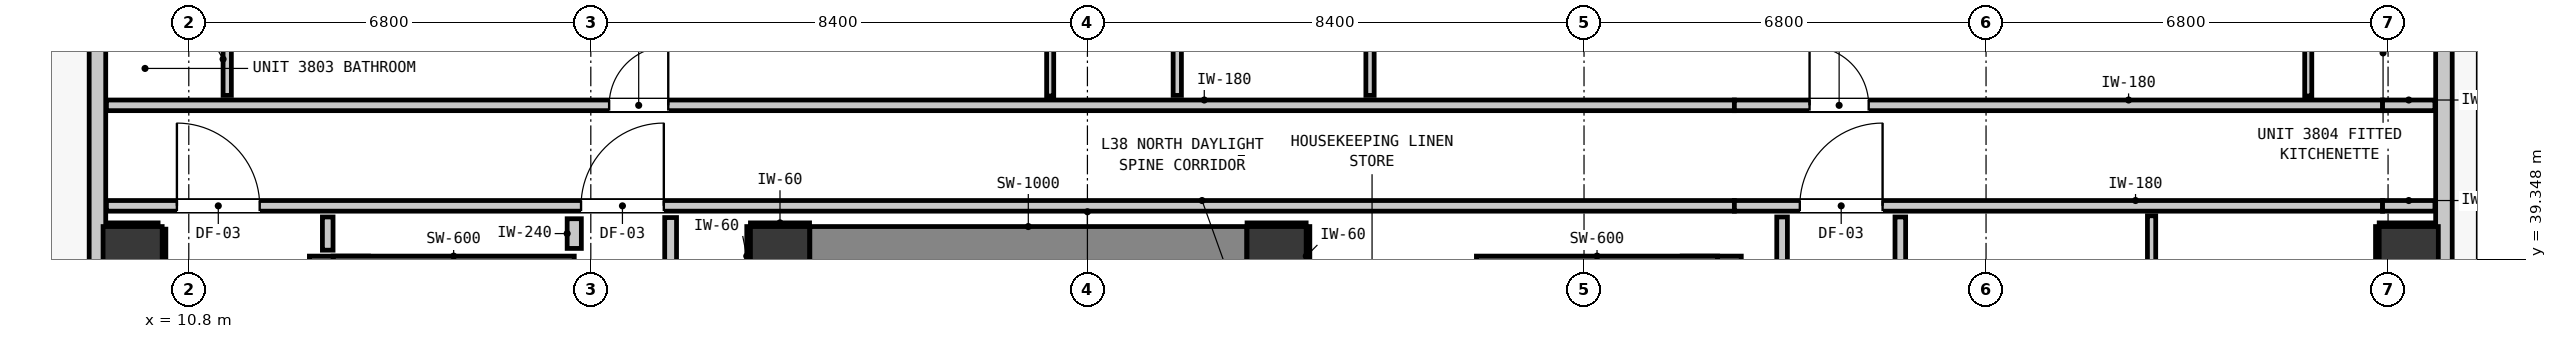
"""IFC4 building model, lengths in metres.
Left out: names, types, materials, properties, quantities, classifications, styles, units other than length and angle.
Written with IfcOpenShell. Run it as: python <this file> out.ifc"""

import sys

from ifc_helpers import new_model, si_unit, direction, frame, frame_2d, origin, origin_2d, place, context, subcontext, project, spatial, rectangle, extrude, element, fill, save


model = new_model("IFC4")
c1 = context("Model", 3, precision=1e-05, world=origin(), true_north=direction((0.0, 1.0)))
c2 = subcontext(c1, "Body", "Model", "MODEL_VIEW")
j1 = project(units=[si_unit("LENGTHUNIT", "METRE"), si_unit("PLANEANGLEUNIT", "RADIAN")], contexts=[c1])
p1 = place(None, origin())
s1 = spatial("IfcSite", under=j1, at=p1, CompositionType="ELEMENT")
p2 = place(p1, origin())
s2 = spatial("IfcBuilding", under=s1, at=p2, CompositionType="ELEMENT")
p3 = place(p2, frame((0.0, 0.0, 132.64)))
s3 = spatial("IfcBuildingStorey", under=s2, at=p3, CompositionType="ELEMENT", Elevation=132.64)
for number, where, z_axis, x_axis in (
    (1, (20.8, 39.4, 0.0), (0.0, 0.0, 1.0), (1.0, 0.0, 0.0)),
    (2, (29.2, 39.4, 0.0), (0.0, 0.0, 1.0), (1.0, 0.0, 0.0)),
):
    element("IfcColumn", number, at=place(p3, frame(where, z_axis=z_axis, x_axis=x_axis)), inside=s3, PredefinedType="COLUMN", context=c2, shape_type="SweptSolid", body=[
        extrude(rectangle(XDim=1.0, YDim=1.0, at=origin_2d()), origin(), (0.0, 0.0, 1.0), 3.32),
    ])
p4 = place(p3, frame((13.34, 31.205, 0.0), z_axis=(0.0, 0.0, 1.0), x_axis=(0.0, 1.0, 0.0)))
e3 = element("IfcWall", 3, at=p4, inside=s3, PredefinedType="SHEAR", context=c2, shape_type="SweptSolid", body=[
    extrude(rectangle(XDim=8.195, YDim=1.0, at=frame_2d((4.097, 0.0))), origin(), (0.0, 0.0, 1.0), 3.32),
])
p5 = place(p3, frame((13.24, 39.1, 0.0), z_axis=(0.0, 0.0, 1.0), x_axis=(1.0, 0.0, 0.0)))
e4 = element("IfcWall", 4, at=p5, inside=s3, PredefinedType="SHEAR", context=c2, shape_type="SweptSolid", body=[
    extrude(rectangle(XDim=4.08, YDim=0.6, at=frame_2d((2.04, 0.0))), origin(), (0.0, 0.0, 1.0), 3.32),
])
p6 = place(p3, frame((36.56, 31.205, 0.0), z_axis=(0.0, 0.0, 1.0), x_axis=(0.0, 1.0, 0.0)))
e5 = element("IfcWall", 5, at=p6, inside=s3, PredefinedType="SHEAR", context=c2, shape_type="SweptSolid", body=[
    extrude(rectangle(XDim=8.195, YDim=1.0, at=frame_2d((4.097, 0.0))), origin(), (0.0, 0.0, 1.0), 3.32),
])
p7 = place(p3, frame((32.58, 39.1, 0.0), z_axis=(0.0, 0.0, 1.0), x_axis=(1.0, 0.0, 0.0)))
e6 = element("IfcWall", 6, at=p7, inside=s3, PredefinedType="SHEAR", context=c2, shape_type="SweptSolid", body=[
    extrude(rectangle(XDim=4.08, YDim=0.6, at=frame_2d((2.04, 0.0))), origin(), (0.0, 0.0, 1.0), 3.32),
])
p8 = place(p3, frame((21.305, 39.4, 0.0), z_axis=(0.0, 0.0, 1.0), x_axis=(1.0, 0.0, 0.0)))
e7 = element("IfcWall", 7, at=p8, inside=s3, PredefinedType="SHEAR", context=c2, shape_type="SweptSolid", body=[
    extrude(rectangle(XDim=7.39, YDim=1.0, at=frame_2d((3.695, 0.0))), origin(), (0.0, 0.0, 1.0), 3.32),
])
for number, where, z_axis, x_axis in (
    (8, (9.85, 39.4, 0.0), (0.0, 0.0, 1.0), (1.0, 0.0, 0.0)),
    (9, (48.35, 39.4, 0.0), (0.0, 0.0, 1.0), (1.0, 0.0, 0.0)),
):
    element("IfcColumn", number, at=place(p3, frame(where, z_axis=z_axis, x_axis=x_axis)), inside=s3, PredefinedType="COLUMN", context=c2, shape_type="SweptSolid", body=[
        extrude(rectangle(XDim=1.0, YDim=1.0, at=origin_2d()), origin(), (0.0, 0.0, 1.0), 3.32),
    ])
p9 = place(p3, frame((9.255, 11.355, 0.0), z_axis=(0.0, 0.0, 1.0), x_axis=(0.0, 1.0, 0.0)))
e10 = element("IfcWall", 10, at=p9, inside=s3, PredefinedType="STANDARD", context=c2, shape_type="SweptSolid", body=[
    extrude(rectangle(XDim=32.29, YDim=0.28, at=frame_2d((16.145, 0.0))), origin(), (0.0, 0.0, 1.0), 3.08),
])
p10 = place(p9, frame((5.818, 0.0, 0.0)))
e11 = element("IfcOpeningElement", 11, at=p10, cuts=e10, PredefinedType="OPENING", context=c2, shape_type="SweptSolid", body=[
    extrude(rectangle(XDim=1.0, YDim=2.15, at=frame_2d((0.5, 1.075))), frame((0.0, 0.15, 0.0), z_axis=(0.0, -1.0, 0.0), x_axis=(1.0, 0.0, 0.0)), (0.0, 0.0, 1.0), 0.3),
])
p11 = place(p9, frame((0.544, 0.0, 0.85)))
e12 = element("IfcOpeningElement", 12, at=p11, cuts=e10, PredefinedType="OPENING", context=c2, shape_type="SweptSolid", body=[
    extrude(rectangle(XDim=1.05, YDim=1.65, at=frame_2d((0.525, 0.825))), frame((0.0, 0.15, 0.0), z_axis=(0.0, -1.0, 0.0), x_axis=(1.0, 0.0, 0.0)), (0.0, 0.0, 1.0), 0.3),
])
p12 = place(p3, frame((48.945, 43.645, 0.0), z_axis=(0.0, 0.0, 1.0), x_axis=(0.0, -1.0, 0.0)))
e13 = element("IfcWall", 13, at=p12, inside=s3, PredefinedType="STANDARD", context=c2, shape_type="SweptSolid", body=[
    extrude(rectangle(XDim=32.29, YDim=0.28, at=frame_2d((16.145, 0.0))), origin(), (0.0, 0.0, 1.0), 3.08),
])
p13 = place(p12, frame((5.467, 0.0, 0.0)))
e14 = element("IfcOpeningElement", 14, at=p13, cuts=e13, PredefinedType="OPENING", context=c2, shape_type="SweptSolid", body=[
    extrude(rectangle(XDim=1.0, YDim=2.15, at=frame_2d((0.5, 1.075))), frame((0.0, 0.15, 0.0), z_axis=(0.0, -1.0, 0.0), x_axis=(1.0, 0.0, 0.0)), (0.0, 0.0, 1.0), 0.3),
])
p14 = place(p12, frame((30.696, 0.0, 0.85)))
e15 = element("IfcOpeningElement", 15, at=p14, cuts=e13, PredefinedType="OPENING", context=c2, shape_type="SweptSolid", body=[
    extrude(rectangle(XDim=1.05, YDim=1.65, at=frame_2d((0.525, 0.825))), frame((0.0, 0.15, 0.0), z_axis=(0.0, -1.0, 0.0), x_axis=(1.0, 0.0, 0.0)), (0.0, 0.0, 1.0), 0.3),
])
p15 = place(p12, frame((14.611, 0.0, 0.85)))
e16 = element("IfcOpeningElement", 16, at=p15, cuts=e13, PredefinedType="OPENING", context=c2, shape_type="SweptSolid", body=[
    extrude(rectangle(XDim=2.1, YDim=1.9, at=frame_2d((1.05, 0.95))), frame((0.0, 0.15, 0.0), z_axis=(0.0, -1.0, 0.0), x_axis=(1.0, 0.0, 0.0)), (0.0, 0.0, 1.0), 0.3),
])
p16 = place(p12, frame((7.106, 0.0, 0.85)))
e17 = element("IfcOpeningElement", 17, at=p16, cuts=e13, PredefinedType="OPENING", context=c2, shape_type="SweptSolid", body=[
    extrude(rectangle(XDim=1.05, YDim=1.65, at=frame_2d((0.525, 0.825))), frame((0.0, 0.15, 0.0), z_axis=(0.0, -1.0, 0.0), x_axis=(1.0, 0.0, 0.0)), (0.0, 0.0, 1.0), 0.3),
])
p17 = place(p3, frame((9.407, 40.25, 0.0), z_axis=(0.0, 0.0, 1.0), x_axis=(1.0, 0.0, 0.0)))
e18 = element("IfcWall", 18, at=p17, inside=s3, PredefinedType="PARTITIONING", context=c2, shape_type="SweptSolid", body=[
    extrude(rectangle(XDim=27.536, YDim=0.18, at=frame_2d((13.768, 0.0))), origin(), (0.0, 0.0, 1.0), 3.08),
])
p18 = place(p17, frame((8.028, 0.0, 0.0)))
e19 = element("IfcOpeningElement", 19, at=p18, cuts=e18, PredefinedType="OPENING", context=c2, shape_type="SweptSolid", body=[
    extrude(rectangle(XDim=1.4, YDim=2.15, at=frame_2d((0.7, 1.075))), frame((0.0, 0.1, 0.0), z_axis=(0.0, -1.0, 0.0), x_axis=(1.0, 0.0, 0.0)), (0.0, 0.0, 1.0), 0.2),
])
p19 = place(p17, frame((1.192, 0.0, 0.0)))
e20 = element("IfcOpeningElement", 20, at=p19, cuts=e18, PredefinedType="OPENING", context=c2, shape_type="SweptSolid", body=[
    extrude(rectangle(XDim=1.4, YDim=2.15, at=frame_2d((0.7, 1.075))), frame((0.0, 0.1, 0.0), z_axis=(0.0, -1.0, 0.0), x_axis=(1.0, 0.0, 0.0)), (0.0, 0.0, 1.0), 0.2),
])
p20 = place(p3, frame((36.943, 40.25, 0.0), z_axis=(0.0, 0.0, 1.0), x_axis=(1.0, 0.0, 0.0)))
e21 = element("IfcWall", 21, at=p20, inside=s3, PredefinedType="PARTITIONING", context=c2, shape_type="SweptSolid", body=[
    extrude(rectangle(XDim=10.964, YDim=0.18, at=frame_2d((5.482, 0.0))), origin(), (0.0, 0.0, 1.0), 2.565),
])
p21 = place(p20, frame((1.107, 0.0, 0.0)))
e22 = element("IfcOpeningElement", 22, at=p21, cuts=e21, PredefinedType="OPENING", context=c2, shape_type="SweptSolid", body=[
    extrude(rectangle(XDim=1.4, YDim=2.15, at=frame_2d((0.7, 1.075))), frame((0.0, 0.1, 0.0), z_axis=(0.0, -1.0, 0.0), x_axis=(1.0, 0.0, 0.0)), (0.0, 0.0, 1.0), 0.2),
])
p22 = place(p3, frame((47.907, 40.25, 0.0), z_axis=(0.0, 0.0, 1.0), x_axis=(1.0, 0.0, 0.0)))
e23 = element("IfcWall", 23, at=p22, inside=s3, PredefinedType="PARTITIONING", context=c2, shape_type="SweptSolid", body=[
    extrude(rectangle(XDim=0.886, YDim=0.18, at=frame_2d((0.443, 0.0))), origin(), (0.0, 0.0, 1.0), 3.08),
])
p23 = place(p3, frame((9.407, 41.95, 0.0), z_axis=(0.0, 0.0, 1.0), x_axis=(1.0, 0.0, 0.0)))
e24 = element("IfcWall", 24, at=p23, inside=s3, PredefinedType="PARTITIONING", context=c2, shape_type="SweptSolid", body=[
    extrude(rectangle(XDim=27.536, YDim=0.18, at=frame_2d((13.768, 0.0))), origin(), (0.0, 0.0, 1.0), 3.08),
])
p24 = place(p23, frame((8.503, 0.0, 0.0)))
e25 = element("IfcOpeningElement", 25, at=p24, cuts=e24, PredefinedType="OPENING", context=c2, shape_type="SweptSolid", body=[
    extrude(rectangle(XDim=1.0, YDim=2.15, at=frame_2d((0.5, 1.075))), frame((0.0, 0.1, 0.0), z_axis=(0.0, -1.0, 0.0), x_axis=(1.0, 0.0, 0.0)), (0.0, 0.0, 1.0), 0.2),
])
p25 = place(p3, frame((36.943, 41.95, 0.0), z_axis=(0.0, 0.0, 1.0), x_axis=(1.0, 0.0, 0.0)))
e26 = element("IfcWall", 26, at=p25, inside=s3, PredefinedType="PARTITIONING", context=c2, shape_type="SweptSolid", body=[
    extrude(rectangle(XDim=10.964, YDim=0.18, at=frame_2d((5.482, 0.0))), origin(), (0.0, 0.0, 1.0), 2.565),
])
p26 = place(p25, frame((1.272, 0.0, 0.0)))
e27 = element("IfcOpeningElement", 27, at=p26, cuts=e26, PredefinedType="OPENING", context=c2, shape_type="SweptSolid", body=[
    extrude(rectangle(XDim=1.0, YDim=2.15, at=frame_2d((0.5, 1.075))), frame((0.0, 0.1, 0.0), z_axis=(0.0, -1.0, 0.0), x_axis=(1.0, 0.0, 0.0)), (0.0, 0.0, 1.0), 0.2),
])
p27 = place(p3, frame((47.907, 41.95, 0.0), z_axis=(0.0, 0.0, 1.0), x_axis=(1.0, 0.0, 0.0)))
e28 = element("IfcWall", 28, at=p27, inside=s3, PredefinedType="PARTITIONING", context=c2, shape_type="SweptSolid", body=[
    extrude(rectangle(XDim=0.886, YDim=0.18, at=frame_2d((0.443, 0.0))), origin(), (0.0, 0.0, 1.0), 3.08),
])
p28 = place(p3, frame((17.32, 39.53, 0.0), z_axis=(0.0, 0.0, 1.0), x_axis=(0.0, 1.0, 0.0)))
e29 = element("IfcWall", 29, at=p28, inside=s3, PredefinedType="PARTITIONING", context=c2, shape_type="SweptSolid", body=[
    extrude(rectangle(XDim=0.502, YDim=0.24, at=frame_2d((0.251, 0.0))), origin(), (0.0, 0.0, 1.0), 3.08),
])
p29 = place(p3, frame((18.95, 38.918, 0.0), z_axis=(0.0, 0.0, 1.0), x_axis=(0.0, 1.0, 0.0)))
e30 = element("IfcWall", 30, at=p29, inside=s3, PredefinedType="PARTITIONING", context=c2, shape_type="SweptSolid", body=[
    extrude(rectangle(XDim=1.134, YDim=0.2, at=frame_2d((0.567, 0.0))), origin(), (0.0, 0.0, 1.0), 3.08),
])
p30 = place(p3, frame((13.15, 39.5, 0.0), z_axis=(0.0, 0.0, 1.0), x_axis=(0.0, 1.0, 0.0)))
e31 = element("IfcWall", 31, at=p30, inside=s3, PredefinedType="PARTITIONING", context=c2, shape_type="SweptSolid", body=[
    extrude(rectangle(XDim=0.562, YDim=0.18, at=frame_2d((0.281, 0.0))), origin(), (0.0, 0.0, 1.0), 2.315),
])
p31 = place(p3, frame((37.75, 21.368, 0.0), z_axis=(0.0, 0.0, 1.0), x_axis=(0.0, 1.0, 0.0)))
e32 = element("IfcWall", 32, at=p31, inside=s3, PredefinedType="PARTITIONING", context=c2, shape_type="SweptSolid", body=[
    extrude(rectangle(XDim=18.694, YDim=0.18, at=frame_2d((9.347, 0.0))), origin(), (0.0, 0.0, 1.0), 3.08),
])
p32 = place(p3, frame((39.75, 35.118, 0.0), z_axis=(0.0, 0.0, 1.0), x_axis=(0.0, 1.0, 0.0)))
e33 = element("IfcWall", 33, at=p32, inside=s3, PredefinedType="PARTITIONING", context=c2, shape_type="SweptSolid", body=[
    extrude(rectangle(XDim=4.944, YDim=0.18, at=frame_2d((2.472, 0.0))), origin(), (0.0, 0.0, 1.0), 3.08),
])
p33 = place(p3, frame((11.45, 42.118, 0.0), z_axis=(0.0, 0.0, 1.0), x_axis=(0.0, 1.0, 0.0)))
e34 = element("IfcWall", 34, at=p33, inside=s3, PredefinedType="PARTITIONING", context=c2, shape_type="SweptSolid", body=[
    extrude(rectangle(XDim=2.808, YDim=0.14, at=frame_2d((1.404, 0.0))), origin(), (0.0, 0.0, 1.0), 2.565),
])
p34 = place(p33, frame((1.327, 0.0, 0.0)))
e35 = element("IfcOpeningElement", 35, at=p34, cuts=e34, PredefinedType="OPENING", context=c2, shape_type="SweptSolid", body=[
    extrude(rectangle(XDim=0.86, YDim=2.02, at=frame_2d((0.43, 1.01))), frame((0.0, 0.08, 0.0), z_axis=(0.0, -1.0, 0.0), x_axis=(1.0, 0.0, 0.0)), (0.0, 0.0, 1.0), 0.16),
])
p35 = place(p3, frame((27.52, 42.118, 0.0), z_axis=(0.0, 0.0, 1.0), x_axis=(0.0, 1.0, 0.0)))
e36 = element("IfcWall", 36, at=p35, inside=s3, PredefinedType="PARTITIONING", context=c2, shape_type="SweptSolid", body=[
    extrude(rectangle(XDim=3.675, YDim=0.14, at=frame_2d((1.837, 0.0))), origin(), (0.0, 0.0, 1.0), 3.08),
])
p36 = place(p3, frame((30.78, 42.118, 0.0), z_axis=(0.0, 0.0, 1.0), x_axis=(0.0, 1.0, 0.0)))
e37 = element("IfcWall", 37, at=p36, inside=s3, PredefinedType="PARTITIONING", context=c2, shape_type="SweptSolid", body=[
    extrude(rectangle(XDim=3.675, YDim=0.14, at=frame_2d((1.837, 0.0))), origin(), (0.0, 0.0, 1.0), 3.08),
])
p37 = place(p36, frame((1.327, 0.0, 0.0)))
e38 = element("IfcOpeningElement", 38, at=p37, cuts=e37, PredefinedType="OPENING", context=c2, shape_type="SweptSolid", body=[
    extrude(rectangle(XDim=0.86, YDim=2.02, at=frame_2d((0.43, 1.01))), frame((0.0, 0.08, 0.0), z_axis=(0.0, -1.0, 0.0), x_axis=(1.0, 0.0, 0.0)), (0.0, 0.0, 1.0), 0.16),
])
p38 = place(p3, frame((44.0, 35.098, 0.0), z_axis=(0.0, 0.0, 1.0), x_axis=(0.0, 1.0, 0.0)))
e39 = element("IfcWall", 39, at=p38, inside=s3, PredefinedType="PARTITIONING", context=c2, shape_type="SweptSolid", body=[
    extrude(rectangle(XDim=4.984, YDim=0.14, at=frame_2d((2.492, 0.0))), origin(), (0.0, 0.0, 1.0), 3.08),
])
p39 = place(p3, frame((25.37, 42.108, 0.0), z_axis=(0.0, 0.0, 1.0), x_axis=(0.0, 1.0, 0.0)))
e40 = element("IfcWall", 40, at=p39, inside=s3, PredefinedType="PARTITIONING", context=c2, shape_type="SweptSolid", body=[
    extrude(rectangle(XDim=3.685, YDim=0.12, at=frame_2d((1.843, 0.0))), origin(), (0.0, 0.0, 1.0), 3.08),
])
p40 = place(p39, frame((1.317, 0.0, 0.0)))
e41 = element("IfcOpeningElement", 41, at=p40, cuts=e40, PredefinedType="OPENING", context=c2, shape_type="SweptSolid", body=[
    extrude(rectangle(XDim=0.9, YDim=2.1, at=frame_2d((0.45, 1.05))), frame((0.0, 0.07, 0.0), z_axis=(0.0, -1.0, 0.0), x_axis=(1.0, 0.0, 0.0)), (0.0, 0.0, 1.0), 0.14),
])
p41 = place(p3, frame((46.65, 42.108, 0.0), z_axis=(0.0, 0.0, 1.0), x_axis=(0.0, 1.0, 0.0)))
e42 = element("IfcWall", 42, at=p41, inside=s3, PredefinedType="PARTITIONING", context=c2, shape_type="SweptSolid", body=[
    extrude(rectangle(XDim=3.617, YDim=0.12, at=frame_2d((1.809, 0.0))), origin(), (0.0, 0.0, 1.0), 3.08),
])
p42 = place(p41, frame((1.317, 0.0, 0.0)))
e43 = element("IfcOpeningElement", 43, at=p42, cuts=e42, PredefinedType="OPENING", context=c2, shape_type="SweptSolid", body=[
    extrude(rectangle(XDim=0.9, YDim=2.1, at=frame_2d((0.45, 1.05))), frame((0.0, 0.07, 0.0), z_axis=(0.0, -1.0, 0.0), x_axis=(1.0, 0.0, 0.0)), (0.0, 0.0, 1.0), 0.14),
])
for number, where, z_axis, x_axis in (
    (44, (20.3, 39.932, 0.0), (0.0, 0.0, 1.0), (1.0, 0.0, 0.0)),
    (45, (20.268, 38.9, 0.0), (0.0, 0.0, 1.0), (0.0, 1.0, 0.0)),
    (46, (28.7, 39.932, 0.0), (0.0, 0.0, 1.0), (1.0, 0.0, 0.0)),
    (47, (29.732, 38.9, 0.0), (0.0, 0.0, 1.0), (0.0, 1.0, 0.0)),
):
    element("IfcWall", number, at=place(p3, frame(where, z_axis=z_axis, x_axis=x_axis)), inside=s3, PredefinedType="PARTITIONING", context=c2, shape_type="SweptSolid", body=[
        extrude(rectangle(XDim=1.0, YDim=0.06, at=frame_2d((0.5, 0.0))), origin(), (0.0, 0.0, 1.0), 1.45),
    ])
p43 = place(p3, frame((9.41, 39.932, 0.0), z_axis=(0.0, 0.0, 1.0), x_axis=(1.0, 0.0, 0.0)))
e48 = element("IfcWall", 48, at=p43, inside=s3, PredefinedType="PARTITIONING", context=c2, shape_type="SweptSolid", body=[
    extrude(rectangle(XDim=0.871, YDim=0.06, at=frame_2d((0.436, 0.0))), origin(), (0.0, 0.0, 1.0), 1.45),
])
p44 = place(p3, frame((10.382, 38.9, 0.0), z_axis=(0.0, 0.0, 1.0), x_axis=(0.0, 1.0, 0.0)))
e49 = element("IfcWall", 49, at=p44, inside=s3, PredefinedType="PARTITIONING", context=c2, shape_type="SweptSolid", body=[
    extrude(rectangle(XDim=0.956, YDim=0.06, at=frame_2d((0.478, 0.0))), origin(), (0.0, 0.0, 1.0), 1.45),
])
p45 = place(p3, frame((47.85, 39.932, 0.0), z_axis=(0.0, 0.0, 1.0), x_axis=(1.0, 0.0, 0.0)))
e50 = element("IfcWall", 50, at=p45, inside=s3, PredefinedType="PARTITIONING", context=c2, shape_type="SweptSolid", body=[
    extrude(rectangle(XDim=0.94, YDim=0.06, at=frame_2d((0.47, 0.0))), origin(), (0.0, 0.0, 1.0), 1.45),
])
p46 = place(p3, frame((47.818, 38.9, 0.0), z_axis=(0.0, 0.0, 1.0), x_axis=(0.0, 1.0, 0.0)))
e51 = element("IfcWall", 51, at=p46, inside=s3, PredefinedType="PARTITIONING", context=c2, shape_type="SweptSolid", body=[
    extrude(rectangle(XDim=1.0, YDim=0.06, at=frame_2d((0.5, 0.0))), origin(), (0.0, 0.0, 1.0), 1.45),
])
p47 = place(p18, origin())
e52 = element("IfcDoor", 52, at=p47, inside=s3, OperationType="SINGLE_SWING_RIGHT", PredefinedType="DOOR", context=c2, shape_type="SweptSolid", body=[
    extrude(rectangle(XDim=1.4, YDim=2.15, at=frame_2d((0.7, 1.075))), frame((0.0, 0.025, 0.0), z_axis=(0.0, -1.0, 0.0), x_axis=(1.0, 0.0, 0.0)), (0.0, 0.0, 1.0), 0.05),
])
fill(e19, e52)
p48 = place(p19, origin())
e53 = element("IfcDoor", 53, at=p48, inside=s3, OperationType="SINGLE_SWING_LEFT", PredefinedType="DOOR", context=c2, shape_type="SweptSolid", body=[
    extrude(rectangle(XDim=1.4, YDim=2.15, at=frame_2d((0.7, 1.075))), frame((0.0, 0.025, 0.0), z_axis=(0.0, -1.0, 0.0), x_axis=(1.0, 0.0, 0.0)), (0.0, 0.0, 1.0), 0.05),
])
fill(e20, e53)
p49 = place(p21, origin())
e54 = element("IfcDoor", 54, at=p49, inside=s3, OperationType="SINGLE_SWING_RIGHT", PredefinedType="DOOR", context=c2, shape_type="SweptSolid", body=[
    extrude(rectangle(XDim=1.4, YDim=2.15, at=frame_2d((0.7, 1.075))), frame((0.0, 0.025, 0.0), z_axis=(0.0, -1.0, 0.0), x_axis=(1.0, 0.0, 0.0)), (0.0, 0.0, 1.0), 0.05),
])
fill(e22, e54)
p50 = place(p24, origin())
e55 = element("IfcDoor", 55, at=p50, inside=s3, OperationType="SINGLE_SWING_RIGHT", PredefinedType="DOOR", context=c2, shape_type="SweptSolid", body=[
    extrude(rectangle(XDim=1.0, YDim=2.15, at=frame_2d((0.5, 1.075))), frame((0.0, 0.025, 0.0), z_axis=(0.0, -1.0, 0.0), x_axis=(1.0, 0.0, 0.0)), (0.0, 0.0, 1.0), 0.05),
])
fill(e25, e55)
p51 = place(p26, origin())
e56 = element("IfcDoor", 56, at=p51, inside=s3, OperationType="SINGLE_SWING_LEFT", PredefinedType="DOOR", context=c2, shape_type="SweptSolid", body=[
    extrude(rectangle(XDim=1.0, YDim=2.15, at=frame_2d((0.5, 1.075))), frame((0.0, 0.025, 0.0), z_axis=(0.0, -1.0, 0.0), x_axis=(1.0, 0.0, 0.0)), (0.0, 0.0, 1.0), 0.05),
])
fill(e27, e56)
save(model, sys.argv[1])
